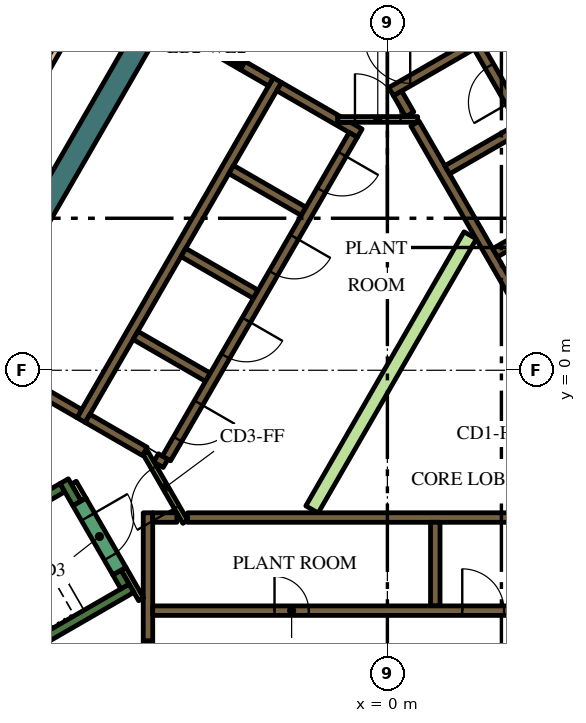
"""IFC4 building model, lengths in metres.
Left out: names, types, materials, properties, quantities, classifications, styles, units other than length and angle.
Written with IfcOpenShell. Run it as: python <this file> out.ifc"""

import sys

from ifc_helpers import new_model, si_unit, direction, frame, frame_2d, origin, place, context, subcontext, project, spatial, polyline, rectangle, outline, extrude, element, fill, save


model = new_model("IFC4")
c1 = context("Model", 3, precision=1e-05, world=origin(), true_north=direction((0.0, 1.0)))
c2 = subcontext(c1, "Body", "Model", "MODEL_VIEW")
j1 = project(units=[si_unit("LENGTHUNIT", "METRE"), si_unit("PLANEANGLEUNIT", "RADIAN")], contexts=[c1])
p1 = place(None, origin())
s1 = spatial("IfcSite", under=j1, at=p1, CompositionType="ELEMENT")
p2 = place(p1, origin())
s2 = spatial("IfcBuilding", under=s1, at=p2, CompositionType="ELEMENT")
p3 = place(p2, frame((0.0, 0.0, 340.2)))
s3 = spatial("IfcBuildingStorey", under=s2, at=p3, CompositionType="ELEMENT", Elevation=340.2)
p4 = place(p3, frame((-4.652, 11.842, 0.0), z_axis=(0.0, 0.0, 1.0), x_axis=(-0.500003640647, -0.866023301845, 0.0)))
e1 = element("IfcWall", 1, at=p4, inside=s3, PredefinedType="SOLIDWALL", context=c2, shape_type="SweptSolid", body=[
    extrude(rectangle(XDim=15.858, YDim=0.6, at=frame_2d((7.929, 0.0))), origin(), (0.0, 0.0, 1.0), 4.2),
])
p5 = place(p3, frame((-14.44, -6.49, 0.0), z_axis=(0.0, 0.0, 1.0), x_axis=(0.866022966069, 0.500004222222, 0.0)))
e2 = element("IfcWall", 2, at=p5, inside=s3, PredefinedType="SOLIDWALL", context=c2, shape_type="SweptSolid", body=[
    extrude(rectangle(XDim=6.8, YDim=0.25, at=frame_2d((3.4, 0.0))), origin(), (0.0, 0.0, 1.0), 4.2),
])
p6 = place(p3, frame((-8.168, -3.503, 0.0), z_axis=(0.0, 0.0, 1.0), x_axis=(-0.499952099219, 0.866053057547, 0.0)))
e3 = element("IfcWall", 3, at=p6, inside=s3, PredefinedType="SOLIDWALL", context=c2, shape_type="SweptSolid", body=[
    extrude(rectangle(XDim=0.675, YDim=0.25, at=frame_2d((0.337, 0.0))), origin(), (0.0, 0.0, 1.0), 4.2),
])
p7 = place(p3, frame((-12.84, -9.261, 0.0), z_axis=(0.0, 0.0, 1.0), x_axis=(0.866016039709, 0.500016218704, 0.0)))
e4 = element("IfcWall", 4, at=p7, inside=s3, PredefinedType="SOLIDWALL", context=c2, shape_type="SweptSolid", body=[
    extrude(rectangle(XDim=7.05, YDim=0.25, at=frame_2d((3.525, 0.0))), origin(), (0.0, 0.0, 1.0), 4.2),
])
p8 = place(p3, frame((-6.905, -5.69, 0.0), z_axis=(0.0, 0.0, 1.0), x_axis=(-0.500402024738, 0.865793170242, 0.0)))
e5 = element("IfcWall", 5, at=p8, inside=s3, PredefinedType="SOLIDWALL", context=c2, shape_type="SweptSolid", body=[
    extrude(rectangle(XDim=0.425, YDim=0.25, at=frame_2d((0.212, 0.0))), origin(), (0.0, 0.0, 1.0), 4.2),
])
p9 = place(p3, frame((-5.259, -3.875, 0.0), z_axis=(0.0, 0.0, 1.0), x_axis=(1.0, 0.0, 0.0)))
e6 = element("IfcWall", 6, at=p9, inside=s3, PredefinedType="SOLIDWALL", context=c2, shape_type="SweptSolid", body=[
    extrude(rectangle(XDim=10.489, YDim=0.25, at=frame_2d((5.244, 0.0))), origin(), (0.0, 0.0, 1.0), 4.2),
])
p10 = place(p3, frame((1.26, -4.0, 0.0), z_axis=(0.0, 0.0, 1.0), x_axis=(0.0, -1.0, 0.0)))
e7 = element("IfcWall", 7, at=p10, inside=s3, PredefinedType="SOLIDWALL", context=c2, shape_type="SweptSolid", body=[
    extrude(rectangle(XDim=2.2, YDim=0.25, at=frame_2d((1.1, 0.0))), origin(), (0.0, 0.0, 1.0), 4.2),
])
p11 = place(p3, frame((-6.3, -7.125, 0.0), z_axis=(0.0, 0.0, 1.0), x_axis=(0.0, 1.0, 0.0)))
e8 = element("IfcWall", 8, at=p11, inside=s3, PredefinedType="SOLIDWALL", context=c2, shape_type="SweptSolid", body=[
    extrude(rectangle(XDim=3.375, YDim=0.25, at=frame_2d((1.687, 0.0))), origin(), (0.0, 0.0, 1.0), 4.2),
])
p12 = place(p3, frame((-6.175, -3.875, 0.0), z_axis=(0.0, 0.0, 1.0), x_axis=(1.0, 0.0, 0.0)))
e9 = element("IfcWall", 9, at=p12, inside=s3, PredefinedType="SOLIDWALL", context=c2, shape_type="SweptSolid", body=[
    extrude(rectangle(XDim=0.637, YDim=0.25, at=frame_2d((0.318, 0.0))), origin(), (0.0, 0.0, 1.0), 4.2),
])
p13 = place(p3, frame((3.647, 9.38, 0.0), z_axis=(0.0, 0.0, 1.0), x_axis=(-0.866027868628, -0.499995730742, 0.0)))
e10 = element("IfcWall", 10, at=p13, inside=s3, PredefinedType="SOLIDWALL", context=c2, shape_type="SweptSolid", body=[
    extrude(rectangle(XDim=4.099, YDim=0.25, at=frame_2d((2.049, 0.0))), origin(), (0.0, 0.0, 1.0), 4.2),
])
p14 = place(p3, frame((0.268, 7.285, 0.0), z_axis=(0.0, 0.0, 1.0), x_axis=(0.500098681536, -0.865968422476, 0.0)))
e11 = element("IfcWall", 11, at=p14, inside=s3, PredefinedType="SOLIDWALL", context=c2, shape_type="SweptSolid", body=[
    extrude(rectangle(XDim=0.636, YDim=0.25, at=frame_2d((0.318, 0.0))), origin(), (0.0, 0.0, 1.0), 4.2),
])
p15 = place(p3, frame((5.97, -2.591, 0.0), z_axis=(0.0, 0.0, 1.0), x_axis=(-0.499994469932, 0.866028596547, 0.0)))
e12 = element("IfcWall", 12, at=p15, inside=s3, PredefinedType="SOLIDWALL", context=c2, shape_type="SweptSolid", body=[
    extrude(rectangle(XDim=10.488, YDim=0.25, at=frame_2d((5.244, 0.0))), origin(), (0.0, 0.0, 1.0), 4.2),
])
p16 = place(p3, frame((1.574, 5.274, 0.0), z_axis=(0.0, 0.0, 1.0), x_axis=(0.866028486751, 0.499994660107, 0.0)))
e13 = element("IfcWall", 13, at=p16, inside=s3, PredefinedType="SOLIDWALL", context=c2, shape_type="SweptSolid", body=[
    extrude(rectangle(XDim=2.2, YDim=0.25, at=frame_2d((1.1, 0.0))), origin(), (0.0, 0.0, 1.0), 4.2),
])
p17 = place(p3, frame((2.834, 3.091, 0.0), z_axis=(0.0, 0.0, 1.0), x_axis=(0.866008176907, 0.50002983664, 0.0)))
e14 = element("IfcWall", 14, at=p17, inside=s3, PredefinedType="SOLIDWALL", context=c2, shape_type="SweptSolid", body=[
    extrude(rectangle(XDim=2.2, YDim=0.25, at=frame_2d((1.1, 0.0))), origin(), (0.0, 0.0, 1.0), 4.2),
])
p18 = place(p3, frame((-8.06, -1.311, 0.0), z_axis=(0.0, 0.0, 1.0), x_axis=(0.50000273126, 0.866023826885, 0.0)))
e15 = element("IfcWall", 15, at=p18, inside=s3, PredefinedType="SOLIDWALL", context=c2, shape_type="SweptSolid", body=[
    extrude(rectangle(XDim=10.33, YDim=0.25, at=frame_2d((5.165, 0.0))), origin(), (0.0, 0.0, 1.0), 4.2),
])
p19 = place(p3, origin())
e16 = element("IfcWall", 16, at=p19, inside=s3, PredefinedType="SOLIDWALL", context=c2, shape_type="SweptSolid", body=[
    extrude(outline(polyline([(-2.912, 7.356), (-2.787, 7.573), (-1.232, 6.675), (-1.303, 6.675), (-1.304, 6.675), (-1.304, 6.675), (-1.304, 6.525), (-1.304, 6.525), (-1.303, 6.525), (-0.971, 6.525), (-0.665, 6.348), (-0.79, 6.132), (-1.007, 6.257), (-1.007, 6.257), (-2.912, 7.356)])), origin(), (0.0, 0.0, 1.0), 4.2),
])
for number, where, z_axis, x_axis in (
    (17, (-2.204, 4.182, 0.0), (0.0, 0.0, 1.0), (-0.866, 0.5, 0.0)),
    (18, (-5.369, 3.1, 0.0), (0.0, 0.0, 1.0), (0.866, -0.5, 0.0)),
    (19, (-4.724, -0.182, 0.0), (0.0, 0.0, 1.0), (-0.866, 0.5, 0.0)),
):
    element("IfcWall", number, at=place(p3, frame(where, z_axis=z_axis, x_axis=x_axis)), inside=s3, PredefinedType="SOLIDWALL", context=c2, shape_type="SweptSolid", body=[
        extrude(rectangle(XDim=2.2, YDim=0.25, at=frame_2d((1.1, 0.0))), origin(), (0.0, 0.0, 1.0), 4.2),
    ])
p20 = place(p3, frame((-6.088, -2.305, 0.0), z_axis=(0.0, 0.0, 1.0), x_axis=(0.866059450854, -0.499941024108, 0.0)))
e20 = element("IfcWall", 20, at=p20, inside=s3, PredefinedType="SOLIDWALL", context=c2, shape_type="SweptSolid", body=[
    extrude(rectangle(XDim=0.29, YDim=0.25, at=frame_2d((0.145, 0.0))), origin(), (0.0, 0.0, 1.0), 4.2),
])
p21 = place(p3, frame((-7.889, -1.265, 0.0), z_axis=(0.0, 0.0, 1.0), x_axis=(0.865986741702, -0.500066958712, 0.0)))
e21 = element("IfcWall", 21, at=p21, inside=s3, PredefinedType="SOLIDWALL", context=c2, shape_type="SweptSolid", body=[
    extrude(rectangle(XDim=1.738, YDim=0.25, at=frame_2d((0.869, 0.0))), origin(), (0.0, 0.0, 1.0), 4.2),
])
p22 = place(p3, frame((-8.106, -1.14, 0.0), z_axis=(0.0, 0.0, 1.0), x_axis=(-0.866008981251, 0.500028443584, 0.0)))
e22 = element("IfcWall", 22, at=p22, inside=s3, PredefinedType="SOLIDWALL", context=c2, shape_type="SweptSolid", body=[
    extrude(rectangle(XDim=3.2, YDim=0.25, at=frame_2d((1.6, 0.0))), origin(), (0.0, 0.0, 1.0), 4.2),
])
p23 = place(p3, frame((-3.066, 7.59, 0.0), z_axis=(0.0, 0.0, 1.0), x_axis=(-0.866081358704, 0.49990307071, 0.0)))
e23 = element("IfcWall", 23, at=p23, inside=s3, PredefinedType="SOLIDWALL", context=c2, shape_type="SweptSolid", body=[
    extrude(rectangle(XDim=0.858, YDim=0.25, at=frame_2d((0.429, 0.0))), origin(), (0.0, 0.0, 1.0), 4.2),
])
e24 = element("IfcWall", 24, at=p19, inside=s3, PredefinedType="SOLIDWALL", context=c2, shape_type="SweptSolid", body=[
    extrude(outline(polyline([(-3.748, 8.128), (-3.813, 8.015), (-4.027, 8.139), (-4.017, 8.156), (-4.008, 8.173), (-4.0, 8.192), (-3.995, 8.21), (-3.991, 8.23), (-3.99, 8.25), (-3.99, 8.268), (-3.748, 8.128)])), origin(), (0.0, 0.0, 1.0), 4.2),
])
p24 = place(p3, frame((-8.252, -2.958, 0.0), z_axis=(0.0, 0.0, 1.0), x_axis=(0.500174715838, -0.865924508047, 0.0)))
e25 = element("IfcWall", 25, at=p24, inside=s3, PredefinedType="PARTITIONING", context=c2, shape_type="SweptSolid", body=[
    extrude(rectangle(XDim=0.514, YDim=0.15, at=frame_2d((0.257, 0.0))), origin(), (0.0, 0.0, 1.0), 3.45),
])
p25 = place(p3, frame((-6.48, -6.027, 0.0), z_axis=(0.0, 0.0, 1.0), x_axis=(-0.499927229454, 0.866067413802, 0.0)))
e26 = element("IfcWall", 26, at=p25, inside=s3, PredefinedType="PARTITIONING", context=c2, shape_type="SweptSolid", body=[
    extrude(rectangle(XDim=0.929, YDim=0.15, at=frame_2d((0.464, 0.0))), origin(), (0.0, 0.0, 1.0), 4.2),
])
e27 = element("IfcWall", 27, at=p19, inside=s3, PredefinedType="PARTITIONING", context=c2, shape_type="SweptSolid", body=[
    extrude(outline(polyline([(2.017, 3.643), (2.342, 3.456), (-1.822, -3.756), (-2.147, -3.568), (2.017, 3.643)])), origin(), (0.0, 0.0, 1.0), 3.45),
])
p26 = place(p3, frame((-6.175, -6.325, 0.0), z_axis=(0.0, 0.0, 1.0), x_axis=(1.0, 0.0, 0.0)))
e28 = element("IfcWall", 28, at=p26, inside=s3, PredefinedType="SOLIDWALL", context=c2, shape_type="SweptSolid", body=[
    extrude(rectangle(XDim=12.35, YDim=0.25, at=frame_2d((6.175, 0.0))), origin(), (0.0, 0.0, 1.0), 4.2),
])
p27 = place(p26, frame((3.205, 0.0, 0.0)))
e29 = element("IfcOpeningElement", 29, at=p27, cuts=e28, PredefinedType="OPENING", context=c2, shape_type="SweptSolid", body=[
    extrude(rectangle(XDim=0.9, YDim=2.1, at=frame_2d((0.45, 1.05))), frame((0.0, 0.135, 0.0), z_axis=(0.0, -1.0, 0.0), x_axis=(1.0, 0.0, 0.0)), (0.0, 0.0, 1.0), 0.27),
])
p28 = place(p26, frame((8.145, 0.0, 0.0)))
e30 = element("IfcOpeningElement", 30, at=p28, cuts=e28, PredefinedType="OPENING", context=c2, shape_type="SweptSolid", body=[
    extrude(rectangle(XDim=1.1, YDim=2.1, at=frame_2d((0.55, 1.05))), frame((0.0, 0.135, 0.0), z_axis=(0.0, -1.0, 0.0), x_axis=(1.0, 0.0, 0.0)), (0.0, 0.0, 1.0), 0.27),
])
p29 = place(p26, frame((10.665, 0.0, 0.0)))
e31 = element("IfcOpeningElement", 31, at=p29, cuts=e28, PredefinedType="OPENING", context=c2, shape_type="SweptSolid", body=[
    extrude(rectangle(XDim=1.1, YDim=2.1, at=frame_2d((0.55, 1.05))), frame((0.0, 0.135, 0.0), z_axis=(0.0, -1.0, 0.0), x_axis=(1.0, 0.0, 0.0)), (0.0, 0.0, 1.0), 0.27),
])
p30 = place(p3, frame((8.565, -2.185, 0.0), z_axis=(0.0, 0.0, 1.0), x_axis=(-0.499997954832, 0.866026584559, 0.0)))
e32 = element("IfcWall", 32, at=p30, inside=s3, PredefinedType="SOLIDWALL", context=c2, shape_type="SweptSolid", body=[
    extrude(rectangle(XDim=12.35, YDim=0.25, at=frame_2d((6.175, 0.0))), origin(), (0.0, 0.0, 1.0), 4.2),
])
p31 = place(p30, frame((0.685, 0.0, 0.0)))
e33 = element("IfcOpeningElement", 33, at=p31, cuts=e32, PredefinedType="OPENING", context=c2, shape_type="SweptSolid", body=[
    extrude(rectangle(XDim=0.9, YDim=2.1, at=frame_2d((0.45, 1.05))), frame((0.0, 0.135, 0.0), z_axis=(0.0, -1.0, 0.0), x_axis=(1.0, 0.0, 0.0)), (0.0, 0.0, 1.0), 0.27),
])
p32 = place(p30, frame((3.105, 0.0, 0.0)))
e34 = element("IfcOpeningElement", 34, at=p32, cuts=e32, PredefinedType="OPENING", context=c2, shape_type="SweptSolid", body=[
    extrude(rectangle(XDim=1.1, YDim=2.1, at=frame_2d((0.55, 1.05))), frame((0.0, 0.135, 0.0), z_axis=(0.0, -1.0, 0.0), x_axis=(1.0, 0.0, 0.0)), (0.0, 0.0, 1.0), 0.27),
])
p33 = place(p30, frame((5.625, 0.0, 0.0)))
e35 = element("IfcOpeningElement", 35, at=p33, cuts=e32, PredefinedType="OPENING", context=c2, shape_type="SweptSolid", body=[
    extrude(rectangle(XDim=1.1, YDim=2.1, at=frame_2d((0.55, 1.05))), frame((0.0, 0.135, 0.0), z_axis=(0.0, -1.0, 0.0), x_axis=(1.0, 0.0, 0.0)), (0.0, 0.0, 1.0), 0.27),
])
p34 = place(p30, frame((8.145, 0.0, 0.0)))
e36 = element("IfcOpeningElement", 36, at=p34, cuts=e32, PredefinedType="OPENING", context=c2, shape_type="SweptSolid", body=[
    extrude(rectangle(XDim=1.1, YDim=2.1, at=frame_2d((0.55, 1.05))), frame((0.0, 0.135, 0.0), z_axis=(0.0, -1.0, 0.0), x_axis=(1.0, 0.0, 0.0)), (0.0, 0.0, 1.0), 0.27),
])
p35 = place(p30, frame((10.665, 0.0, 0.0)))
e37 = element("IfcOpeningElement", 37, at=p35, cuts=e32, PredefinedType="OPENING", context=c2, shape_type="SweptSolid", body=[
    extrude(rectangle(XDim=1.1, YDim=2.1, at=frame_2d((0.55, 1.05))), frame((0.0, 0.135, 0.0), z_axis=(0.0, -1.0, 0.0), x_axis=(1.0, 0.0, 0.0)), (0.0, 0.0, 1.0), 0.27),
])
p36 = place(p3, frame((-0.898, 6.194, 0.0), z_axis=(0.0, 0.0, 1.0), x_axis=(-0.499996202215, -0.866027596426, 0.0)))
e38 = element("IfcWall", 38, at=p36, inside=s3, PredefinedType="SOLIDWALL", context=c2, shape_type="SweptSolid", body=[
    extrude(rectangle(XDim=9.83, YDim=0.25, at=frame_2d((4.915, 0.0))), origin(), (0.0, 0.0, 1.0), 4.2),
])
p37 = place(p36, frame((0.585, 0.0, 0.0)))
e39 = element("IfcOpeningElement", 39, at=p37, cuts=e38, PredefinedType="OPENING", context=c2, shape_type="SweptSolid", body=[
    extrude(rectangle(XDim=1.1, YDim=2.1, at=frame_2d((0.55, 1.05))), frame((0.0, 0.135, 0.0), z_axis=(0.0, -1.0, 0.0), x_axis=(1.0, 0.0, 0.0)), (0.0, 0.0, 1.0), 0.27),
])
p38 = place(p36, frame((3.105, 0.0, 0.0)))
e40 = element("IfcOpeningElement", 40, at=p38, cuts=e38, PredefinedType="OPENING", context=c2, shape_type="SweptSolid", body=[
    extrude(rectangle(XDim=1.1, YDim=2.1, at=frame_2d((0.55, 1.05))), frame((0.0, 0.135, 0.0), z_axis=(0.0, -1.0, 0.0), x_axis=(1.0, 0.0, 0.0)), (0.0, 0.0, 1.0), 0.27),
])
p39 = place(p36, frame((5.625, 0.0, 0.0)))
e41 = element("IfcOpeningElement", 41, at=p39, cuts=e38, PredefinedType="OPENING", context=c2, shape_type="SweptSolid", body=[
    extrude(rectangle(XDim=1.1, YDim=2.1, at=frame_2d((0.55, 1.05))), frame((0.0, 0.135, 0.0), z_axis=(0.0, -1.0, 0.0), x_axis=(1.0, 0.0, 0.0)), (0.0, 0.0, 1.0), 0.27),
])
p40 = place(p36, frame((8.145, 0.0, 0.0)))
e42 = element("IfcOpeningElement", 42, at=p40, cuts=e38, PredefinedType="OPENING", context=c2, shape_type="SweptSolid", body=[
    extrude(rectangle(XDim=1.1, YDim=2.1, at=frame_2d((0.55, 1.05))), frame((0.0, 0.135, 0.0), z_axis=(0.0, -1.0, 0.0), x_axis=(1.0, 0.0, 0.0)), (0.0, 0.0, 1.0), 0.27),
])
p41 = place(p3, frame((-8.103, -3.466, 0.0), z_axis=(0.0, 0.0, 1.0), x_axis=(0.500078061341, -0.865980330357, 0.0)))
e43 = element("IfcWall", 43, at=p41, inside=s3, PredefinedType="SOLIDWALL", context=c2, shape_type="SweptSolid", body=[
    extrude(rectangle(XDim=2.1, YDim=0.4, at=frame_2d((1.05, 0.0))), origin(), (0.0, 0.0, 1.0), 4.2),
])
p42 = place(p41, frame((0.45, 0.0, 0.0)))
e44 = element("IfcOpeningElement", 44, at=p42, cuts=e43, PredefinedType="OPENING", context=c2, shape_type="SweptSolid", body=[
    extrude(rectangle(XDim=1.2, YDim=2.1, at=frame_2d((0.6, 1.05))), frame((0.0, 0.21, 0.0), z_axis=(0.0, -1.0, 0.0), x_axis=(1.0, 0.0, 0.0)), (0.0, 0.0, 1.0), 0.42),
])
p43 = place(p3, frame((-6.3, -7.125, 0.0), z_axis=(0.0, 0.0, 1.0), x_axis=(0.0, -1.0, 0.0)))
e45 = element("IfcWall", 45, at=p43, inside=s3, PredefinedType="SOLIDWALL", context=c2, shape_type="SweptSolid", body=[
    extrude(rectangle(XDim=1.8, YDim=0.25, at=frame_2d((0.9, 0.0))), origin(), (0.0, 0.0, 1.0), 4.2),
])
p44 = place(p43, frame((0.45, 0.0, 0.0)))
e46 = element("IfcOpeningElement", 46, at=p44, cuts=e45, PredefinedType="OPENING", context=c2, shape_type="SweptSolid", body=[
    extrude(rectangle(XDim=0.9, YDim=2.1, at=frame_2d((0.45, 1.05))), frame((0.0, 0.135, 0.0), z_axis=(0.0, -1.0, 0.0), x_axis=(1.0, 0.0, 0.0)), (0.0, 0.0, 1.0), 0.27),
])
p45 = place(p3, frame((-1.303, 6.6, 0.0), z_axis=(0.0, 0.0, 1.0), x_axis=(1.0, 0.0, 0.0)))
e47 = element("IfcWall", 47, at=p45, inside=s3, PredefinedType="PARTITIONING", context=c2, shape_type="SweptSolid", body=[
    extrude(rectangle(XDim=2.1, YDim=0.15, at=frame_2d((1.05, 0.0))), origin(), (0.0, 0.0, 1.0), 4.2),
])
p46 = place(p45, frame((0.45, 0.0, 0.0)))
e48 = element("IfcOpeningElement", 48, at=p46, cuts=e47, PredefinedType="OPENING", context=c2, shape_type="SweptSolid", body=[
    extrude(rectangle(XDim=1.2, YDim=2.1, at=frame_2d((0.6, 1.05))), frame((0.0, 0.085, 0.0), z_axis=(0.0, -1.0, 0.0), x_axis=(1.0, 0.0, 0.0)), (0.0, 0.0, 1.0), 0.17),
])
p47 = place(p3, frame((-5.317, -3.99, 0.0), z_axis=(0.0, 0.0, 1.0), x_axis=(-0.500027713859, 0.866009402589, 0.0)))
e49 = element("IfcWall", 49, at=p47, inside=s3, PredefinedType="PARTITIONING", context=c2, shape_type="SweptSolid", body=[
    extrude(rectangle(XDim=2.1, YDim=0.15, at=frame_2d((1.05, 0.0))), origin(), (0.0, 0.0, 1.0), 4.2),
])
p48 = place(p47, frame((0.45, 0.0, 0.0)))
e50 = element("IfcOpeningElement", 50, at=p48, cuts=e49, PredefinedType="OPENING", context=c2, shape_type="SweptSolid", body=[
    extrude(rectangle(XDim=1.2, YDim=2.1, at=frame_2d((0.6, 1.05))), frame((0.0, 0.085, 0.0), z_axis=(0.0, -1.0, 0.0), x_axis=(1.0, 0.0, 0.0)), (0.0, 0.0, 1.0), 0.17),
])
p49 = place(p3, frame((-5.659, 9.012, 0.0), z_axis=(0.0, 0.0, 1.0), x_axis=(0.866009402589, -0.500027713859, 0.0)))
e51 = element("IfcWall", 51, at=p49, inside=s3, PredefinedType="PARTITIONING", context=c2, shape_type="SweptSolid", body=[
    extrude(rectangle(XDim=2.1, YDim=0.12, at=frame_2d((1.05, 0.0))), origin(), (0.0, 0.0, 1.0), 3.45),
])
p50 = place(p49, frame((0.45, 0.0, 0.0)))
e52 = element("IfcOpeningElement", 52, at=p50, cuts=e51, PredefinedType="OPENING", context=c2, shape_type="SweptSolid", body=[
    extrude(rectangle(XDim=1.2, YDim=2.1, at=frame_2d((0.6, 1.05))), frame((0.0, 0.07, 0.0), z_axis=(0.0, -1.0, 0.0), x_axis=(1.0, 0.0, 0.0)), (0.0, 0.0, 1.0), 0.14),
])
p51 = place(p3, frame((-8.602, 8.602, 0.0), z_axis=(0.0, 0.0, 1.0), x_axis=(-0.499992973356, -0.866029460581, 0.0)))
e53 = element("IfcWall", 53, at=p51, inside=s3, PredefinedType="PARTITIONING", context=c2, shape_type="SweptSolid", body=[
    extrude(rectangle(XDim=17.265, YDim=0.2, at=frame_2d((8.632, 0.0))), origin(), (0.0, 0.0, 1.0), 3.45),
])
p52 = place(p51, frame((7.833, 0.0, 0.0)))
e54 = element("IfcOpeningElement", 54, at=p52, cuts=e53, PredefinedType="OPENING", context=c2, shape_type="SweptSolid", body=[
    extrude(rectangle(XDim=1.6, YDim=2.1, at=frame_2d((0.8, 1.05))), frame((0.0, 0.11, 0.0), z_axis=(0.0, -1.0, 0.0), x_axis=(1.0, 0.0, 0.0)), (0.0, 0.0, 1.0), 0.22),
])
p53 = place(p3, frame((-7.54, 16.64, 0.0), z_axis=(0.0, 0.0, 1.0), x_axis=(-0.500002158106, -0.866024157798, 0.0)))
e55 = element("IfcWall", 55, at=p53, inside=s3, PredefinedType="SOLIDWALL", context=c2, shape_type="SweptSolid", body=[
    extrude(rectangle(XDim=21.282, YDim=0.3, at=frame_2d((10.641, 0.0))), origin(), (0.0, 0.0, 1.0), 3.45),
])
p54 = place(p27, origin())
e56 = element("IfcDoor", 56, at=p54, inside=s3, OperationType="SINGLE_SWING_LEFT", PredefinedType="DOOR", context=c2, shape_type="SweptSolid", body=[
    extrude(rectangle(XDim=0.9, YDim=2.1, at=frame_2d((0.45, 1.05))), frame((0.0, 0.025, 0.0), z_axis=(0.0, -1.0, 0.0), x_axis=(1.0, 0.0, 0.0)), (0.0, 0.0, 1.0), 0.05),
])
fill(e29, e56)
p55 = place(p28, origin())
e57 = element("IfcDoor", 57, at=p55, inside=s3, OperationType="DOUBLE_DOOR_SLIDING", PredefinedType="DOOR", context=c2, shape_type="SweptSolid", body=[
    extrude(rectangle(XDim=1.1, YDim=2.1, at=frame_2d((0.55, 1.05))), frame((0.0, 0.025, 0.0), z_axis=(0.0, -1.0, 0.0), x_axis=(1.0, 0.0, 0.0)), (0.0, 0.0, 1.0), 0.05),
])
fill(e30, e57)
p56 = place(p35, origin())
e58 = element("IfcDoor", 58, at=p56, inside=s3, OperationType="DOUBLE_DOOR_SLIDING", PredefinedType="DOOR", context=c2, shape_type="SweptSolid", body=[
    extrude(rectangle(XDim=1.1, YDim=2.1, at=frame_2d((0.55, 1.05))), frame((0.0, 0.025, 0.0), z_axis=(0.0, -1.0, 0.0), x_axis=(1.0, 0.0, 0.0)), (0.0, 0.0, 1.0), 0.05),
])
fill(e37, e58)
p57 = place(p37, origin())
e59 = element("IfcDoor", 59, at=p57, inside=s3, OperationType="DOUBLE_DOOR_SLIDING", PredefinedType="DOOR", context=c2, shape_type="SweptSolid", body=[
    extrude(rectangle(XDim=1.1, YDim=2.1, at=frame_2d((0.55, 1.05))), frame((0.0, 0.025, 0.0), z_axis=(0.0, -1.0, 0.0), x_axis=(1.0, 0.0, 0.0)), (0.0, 0.0, 1.0), 0.05),
])
fill(e39, e59)
p58 = place(p38, origin())
e60 = element("IfcDoor", 60, at=p58, inside=s3, OperationType="DOUBLE_DOOR_SLIDING", PredefinedType="DOOR", context=c2, shape_type="SweptSolid", body=[
    extrude(rectangle(XDim=1.1, YDim=2.1, at=frame_2d((0.55, 1.05))), frame((0.0, 0.025, 0.0), z_axis=(0.0, -1.0, 0.0), x_axis=(1.0, 0.0, 0.0)), (0.0, 0.0, 1.0), 0.05),
])
fill(e40, e60)
p59 = place(p39, origin())
e61 = element("IfcDoor", 61, at=p59, inside=s3, OperationType="DOUBLE_DOOR_SLIDING", PredefinedType="DOOR", context=c2, shape_type="SweptSolid", body=[
    extrude(rectangle(XDim=1.1, YDim=2.1, at=frame_2d((0.55, 1.05))), frame((0.0, 0.025, 0.0), z_axis=(0.0, -1.0, 0.0), x_axis=(1.0, 0.0, 0.0)), (0.0, 0.0, 1.0), 0.05),
])
fill(e41, e61)
p60 = place(p40, origin())
e62 = element("IfcDoor", 62, at=p60, inside=s3, OperationType="DOUBLE_DOOR_SLIDING", PredefinedType="DOOR", context=c2, shape_type="SweptSolid", body=[
    extrude(rectangle(XDim=1.1, YDim=2.1, at=frame_2d((0.55, 1.05))), frame((0.0, 0.025, 0.0), z_axis=(0.0, -1.0, 0.0), x_axis=(1.0, 0.0, 0.0)), (0.0, 0.0, 1.0), 0.05),
])
fill(e42, e62)
p61 = place(p42, origin())
e63 = element("IfcDoor", 63, at=p61, inside=s3, OperationType="SINGLE_SWING_LEFT", PredefinedType="DOOR", context=c2, shape_type="SweptSolid", body=[
    extrude(rectangle(XDim=1.2, YDim=2.1, at=frame_2d((0.6, 1.05))), frame((0.0, 0.025, 0.0), z_axis=(0.0, -1.0, 0.0), x_axis=(1.0, 0.0, 0.0)), (0.0, 0.0, 1.0), 0.05),
])
fill(e44, e63)
p62 = place(p46, origin())
e64 = element("IfcDoor", 64, at=p62, inside=s3, OperationType="SINGLE_SWING_LEFT", PredefinedType="DOOR", context=c2, shape_type="SweptSolid", body=[
    extrude(rectangle(XDim=1.2, YDim=2.1, at=frame_2d((0.6, 1.05))), frame((0.0, 0.025, 0.0), z_axis=(0.0, -1.0, 0.0), x_axis=(1.0, 0.0, 0.0)), (0.0, 0.0, 1.0), 0.05),
])
fill(e48, e64)
p63 = place(p48, origin())
e65 = element("IfcDoor", 65, at=p63, inside=s3, OperationType="SINGLE_SWING_LEFT", PredefinedType="DOOR", context=c2, shape_type="SweptSolid", body=[
    extrude(rectangle(XDim=1.2, YDim=2.1, at=frame_2d((0.6, 1.05))), frame((0.0, 0.025, 0.0), z_axis=(0.0, -1.0, 0.0), x_axis=(1.0, 0.0, 0.0)), (0.0, 0.0, 1.0), 0.05),
])
fill(e50, e65)
p64 = place(p50, origin())
e66 = element("IfcDoor", 66, at=p64, inside=s3, OperationType="SINGLE_SWING_LEFT", PredefinedType="DOOR", context=c2, shape_type="SweptSolid", body=[
    extrude(rectangle(XDim=1.2, YDim=2.1, at=frame_2d((0.6, 1.05))), frame((0.0, 0.025, 0.0), z_axis=(0.0, -1.0, 0.0), x_axis=(1.0, 0.0, 0.0)), (0.0, 0.0, 1.0), 0.05),
])
fill(e52, e66)
save(model, sys.argv[1])
